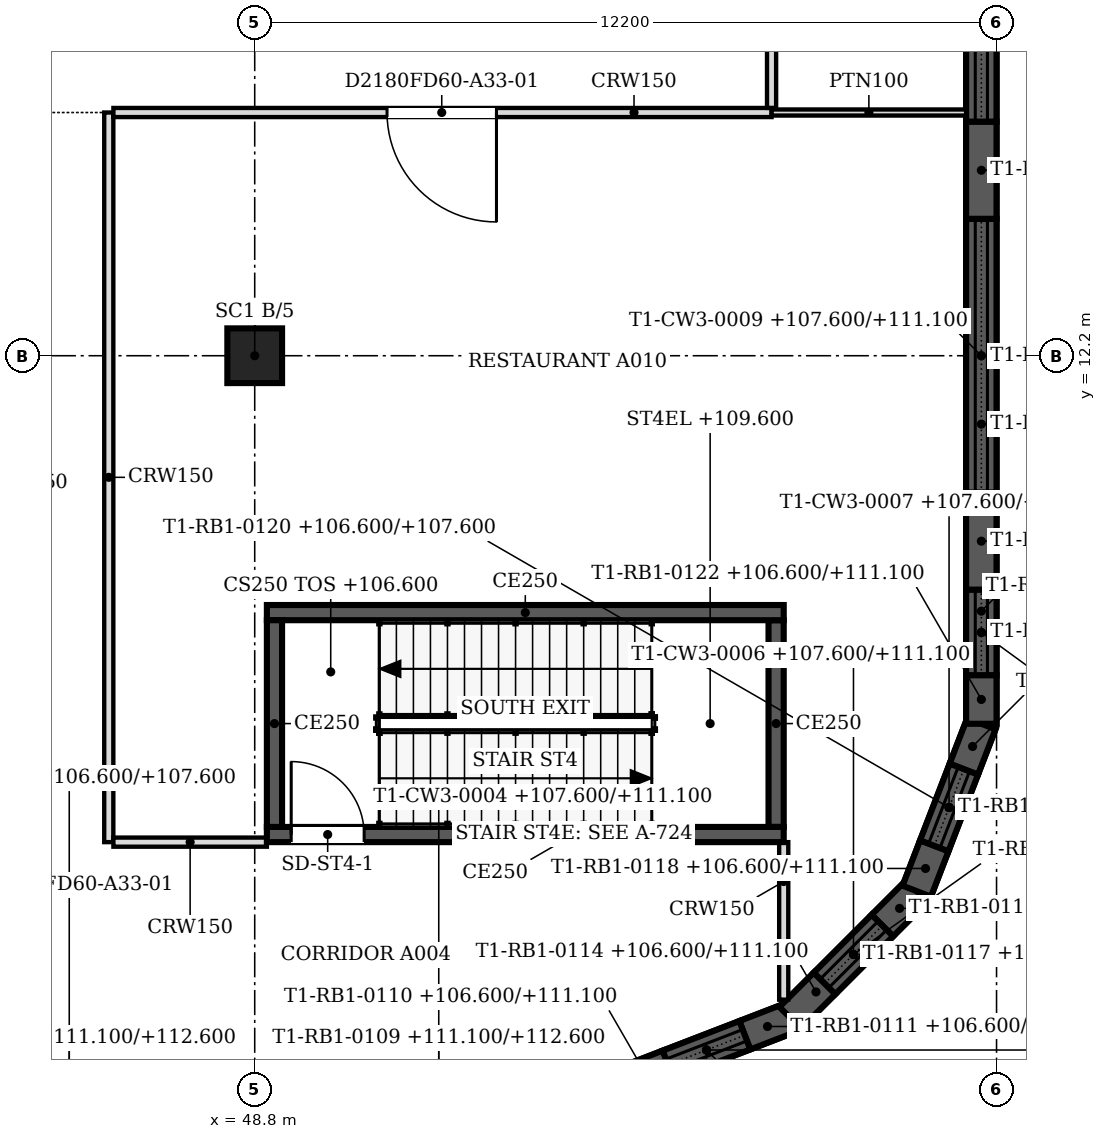
"""IFC4 building model, lengths in metres.
Left out: names, types, materials, properties, quantities, classifications, styles, units other than length and angle.
Written with IfcOpenShell. Run it as: python <this file> out.ifc"""

import sys

from ifc_helpers import new_model, si_unit, direction, frame, frame_2d, origin, origin_2d, place, context, subcontext, project, spatial, polyline, rectangle, outline, extrude, faceted_brep, source, transform, mapped, element, fill, save


model = new_model("IFC4")
c1 = context("Model", 3, precision=1e-05, world=origin(), true_north=direction((0.0, 1.0)))
c2 = subcontext(c1, "Body", "Model", "MODEL_VIEW")
j1 = project(units=[si_unit("LENGTHUNIT", "METRE"), si_unit("PLANEANGLEUNIT", "RADIAN")], contexts=[c1])
p1 = place(None, origin())
s1 = spatial("IfcSite", under=j1, at=p1, CompositionType="ELEMENT")
p2 = place(p1, origin())
s2 = spatial("IfcBuilding", under=s1, at=p2, CompositionType="ELEMENT")
p3 = place(p2, frame((0.0, 0.0, 106.6)))
s3 = spatial("IfcBuildingStorey", under=s2, at=p3, CompositionType="ELEMENT", Elevation=106.6)
p4 = place(p3, frame((48.8, 12.2, 0.0), z_axis=(0.0, 0.0, 1.0), x_axis=(1.0, 0.0, 0.0)))
e1 = element("IfcColumn", 1, at=p4, inside=s3, PredefinedType="COLUMN", context=c2, shape_type="SweptSolid", body=[
    extrude(rectangle(XDim=0.9, YDim=0.9, at=origin_2d()), origin(), (0.0, 0.0, 1.0), 5.8),
])
m1 = source(origin(), c2, "Body", "Brep", [
    faceted_brep([(0.0, -0.25, 0.0), (0.8, -0.25, 0.0), (0.8, -0.25, 4.5), (0.0, -0.25, 4.5), (0.047, 0.25, 4.5), (0.8, 0.25, 4.5), (0.8, 0.25, 0.0), (0.047, 0.25, 0.0), (0.0, 0.0, 0.0), (0.0, 0.0, 4.5)], [[[0, 1, 2, 3]], [[4, 5, 6, 7]], [[7, 6, 1, 0, 8]], [[5, 4, 9, 3, 2]], [[8, 0, 3, 9]], [[7, 8, 9, 4]], [[1, 6, 5, 2]]]),
])
p5 = place(p3, frame((54.854, 0.25, 0.0), z_axis=(0.0, 0.0, 1.0), x_axis=(0.93301483327, 0.3598379092, 0.0)))
e2 = element("IfcWall", 2, at=p5, inside=s3, PredefinedType="SOLIDWALL", context=c2, shape_type="MappedRepresentation", body=[
    mapped(m1, transform((0.0, 0.0, 0.0), scale=1.0)),
])
m2 = source(origin(), c2, "Body", "Brep", [
    faceted_brep([(0.0, -0.25, 0.0), (0.8, -0.25, 0.0), (0.8, -0.25, 4.5), (0.0, -0.25, 4.5), (0.0, 0.25, 4.5), (0.747, 0.25, 4.5), (0.747, 0.25, 0.0), (0.0, 0.25, 0.0), (0.8, -0.0, 0.0), (0.8, -0.0, 4.5)], [[[0, 1, 2, 3]], [[4, 5, 6, 7]], [[7, 6, 8, 1, 0]], [[9, 2, 1, 8]], [[5, 4, 3, 2, 9]], [[4, 7, 0, 3]], [[8, 6, 5, 9]]]),
])
p6 = place(p3, frame((56.86, 1.024, 0.0), z_axis=(0.0, 0.0, 1.0), x_axis=(0.932912338632, 0.360103552367, 0.0)))
e3 = element("IfcWall", 3, at=p6, inside=s3, PredefinedType="SOLIDWALL", context=c2, shape_type="MappedRepresentation", body=[
    mapped(m2, transform((0.0, 0.0, 0.0), scale=1.0)),
])
m3 = source(origin(), c2, "Body", "SweptSolid", [
    extrude(outline(polyline([(0.0, 0.0), (1.351, 0.0), (1.351, 1.0), (0.0, 1.0), (0.0, 0.0)])), frame((0.0, 0.25, 0.0), z_axis=(0.0, -1.0, 0.0), x_axis=(1.0, 0.0, 0.0)), (0.0, 0.0, 1.0), 0.5),
])
p7 = place(p3, frame((55.6, 0.538, 0.0), z_axis=(0.0, 0.0, 1.0), x_axis=(0.932981713512, 0.359923772835, 0.0)))
e4 = element("IfcWall", 4, at=p7, inside=s3, PredefinedType="SOLIDWALL", context=c2, shape_type="MappedRepresentation", body=[
    mapped(m3, transform((0.0, 0.0, 0.0), scale=1.0)),
])
m4 = source(origin(), c2, "Body", "Brep", [
    faceted_brep([(0.0, -0.25, 0.0), (2.95, -0.25, 0.0), (2.95, -0.25, 1.5), (0.0, -0.25, 1.5), (0.047, 0.25, 1.5), (2.898, 0.25, 1.5), (2.898, 0.25, 0.0), (0.047, 0.25, 0.0), (2.95, 0.0, 0.0), (0.0, 0.0, 0.0), (2.95, 0.0, 1.5), (0.0, 0.0, 1.5)], [[[0, 1, 2, 3]], [[4, 5, 6, 7]], [[7, 6, 8, 1, 0, 9]], [[10, 2, 1, 8]], [[5, 4, 11, 3, 2, 10]], [[9, 0, 3, 11]], [[7, 9, 11, 4]], [[8, 6, 5, 10]]]),
])
p8 = place(p3, frame((54.854, 0.25, 4.5), z_axis=(0.0, 0.0, 1.0), x_axis=(0.932999673775, 0.359877213415, 0.0)))
e5 = element("IfcWall", 5, at=p8, inside=s3, PredefinedType="SOLIDWALL", context=c2, shape_type="MappedRepresentation", body=[
    mapped(m4, transform((0.0, 0.0, 0.0), scale=1.0)),
])
m5 = source(origin(), c2, "Body", "Brep", [
    faceted_brep([(0.0, -0.25, 0.0), (0.8, -0.25, 0.0), (0.8, -0.25, 4.5), (0.0, -0.25, 4.5), (0.053, 0.25, 4.5), (0.8, 0.25, 4.5), (0.8, 0.25, 0.0), (0.053, 0.25, 0.0), (0.0, 0.0, 0.0), (0.0, 0.0, 4.5)], [[[0, 1, 2, 3]], [[4, 5, 6, 7]], [[7, 6, 1, 0, 8]], [[5, 4, 9, 3, 2]], [[8, 0, 3, 9]], [[7, 8, 9, 4]], [[1, 6, 5, 2]]]),
])
p9 = place(p3, frame((57.606, 1.312, 0.0), z_axis=(0.0, 0.0, 1.0), x_axis=(0.707106781187, 0.707106781187, 0.0)))
e6 = element("IfcWall", 6, at=p9, inside=s3, PredefinedType="SOLIDWALL", context=c2, shape_type="MappedRepresentation", body=[
    mapped(m5, transform((0.0, 0.0, 0.0), scale=1.0)),
])
p10 = place(p3, frame((59.122, 2.828, 0.0), z_axis=(0.0, 0.0, 1.0), x_axis=(0.707259322823, 0.706954206636, 0.0)))
e7 = element("IfcWall", 7, at=p10, inside=s3, PredefinedType="SOLIDWALL", context=c2, shape_type="MappedRepresentation", body=[
    mapped(m2, transform((0.0, 0.0, 0.0), scale=1.0)),
])
m6 = source(origin(), c2, "Body", "SweptSolid", [
    extrude(outline(polyline([(0.0, 0.0), (1.344, 0.0), (1.344, 1.0), (0.0, 1.0), (0.0, 0.0)])), frame((0.0, 0.25, 0.0), z_axis=(0.0, -1.0, 0.0), x_axis=(1.0, 0.0, 0.0)), (0.0, 0.0, 1.0), 0.5),
])
p11 = place(p3, frame((58.172, 1.878, 0.0), z_axis=(0.0, 0.0, 1.0), x_axis=(0.707106781187, 0.707106781187, 0.0)))
e8 = element("IfcWall", 8, at=p11, inside=s3, PredefinedType="SOLIDWALL", context=c2, shape_type="MappedRepresentation", body=[
    mapped(m6, transform((0.0, 0.0, 0.0), scale=1.0)),
])
m7 = source(origin(), c2, "Body", "Brep", [
    faceted_brep([(0.0, -0.25, 0.0), (2.944, -0.25, 0.0), (2.944, -0.25, 1.5), (0.0, -0.25, 1.5), (0.053, 0.25, 1.5), (2.891, 0.25, 1.5), (2.891, 0.25, 0.0), (0.053, 0.25, 0.0), (2.944, 0.0, 0.0), (0.0, 0.0, 0.0), (2.944, 0.0, 1.5), (0.0, 0.0, 1.5)], [[[0, 1, 2, 3]], [[4, 5, 6, 7]], [[7, 6, 8, 1, 0, 9]], [[10, 2, 1, 8]], [[5, 4, 11, 3, 2, 10]], [[9, 0, 3, 11]], [[7, 9, 11, 4]], [[8, 6, 5, 10]]]),
])
p12 = place(p3, frame((57.606, 1.312, 4.5), z_axis=(0.0, 0.0, 1.0), x_axis=(0.707106781187, 0.707106781187, 0.0)))
e9 = element("IfcWall", 9, at=p12, inside=s3, PredefinedType="SOLIDWALL", context=c2, shape_type="MappedRepresentation", body=[
    mapped(m7, transform((0.0, 0.0, 0.0), scale=1.0)),
])
p13 = place(p3, frame((59.688, 3.394, 0.0), z_axis=(0.0, 0.0, 1.0), x_axis=(0.360103552367, 0.932912338632, 0.0)))
e10 = element("IfcWall", 10, at=p13, inside=s3, PredefinedType="SOLIDWALL", context=c2, shape_type="MappedRepresentation", body=[
    mapped(m5, transform((0.0, 0.0, 0.0), scale=1.0)),
])
m8 = source(origin(), c2, "Body", "Brep", [
    faceted_brep([(0.0, -0.25, 0.0), (0.8, -0.25, 0.0), (0.8, -0.25, 4.5), (0.0, -0.25, 4.5), (0.0, 0.25, 4.5), (0.753, 0.25, 4.5), (0.753, 0.25, 0.0), (0.0, 0.25, 0.0), (0.8, -0.0, 0.0), (0.8, -0.0, 4.5)], [[[0, 1, 2, 3]], [[4, 5, 6, 7]], [[7, 6, 8, 1, 0]], [[9, 2, 1, 8]], [[5, 4, 3, 2, 9]], [[4, 7, 0, 3]], [[8, 6, 5, 9]]]),
])
p14 = place(p3, frame((60.462, 5.4, 0.0), z_axis=(0.0, 0.0, 1.0), x_axis=(0.3598379092, 0.93301483327, 0.0)))
e11 = element("IfcWall", 11, at=p14, inside=s3, PredefinedType="SOLIDWALL", context=c2, shape_type="MappedRepresentation", body=[
    mapped(m8, transform((0.0, 0.0, 0.0), scale=1.0)),
])
p15 = place(p3, frame((59.976, 4.14, 0.0), z_axis=(0.0, 0.0, 1.0), x_axis=(0.359923772835, 0.932981713512, 0.0)))
e12 = element("IfcWall", 12, at=p15, inside=s3, PredefinedType="SOLIDWALL", context=c2, shape_type="MappedRepresentation", body=[
    mapped(m3, transform((0.0, 0.0, 0.0), scale=1.0)),
])
m9 = source(origin(), c2, "Body", "Brep", [
    faceted_brep([(0.0, -0.25, 0.0), (2.95, -0.25, 0.0), (2.95, -0.25, 1.5), (0.0, -0.25, 1.5), (0.053, 0.25, 1.5), (2.904, 0.25, 1.5), (2.904, 0.25, 0.0), (0.053, 0.25, 0.0), (2.95, 0.0, 0.0), (0.0, 0.0, 0.0), (2.95, 0.0, 1.5), (0.0, 0.0, 1.5)], [[[0, 1, 2, 3]], [[4, 5, 6, 7]], [[7, 6, 8, 1, 0, 9]], [[10, 2, 1, 8]], [[5, 4, 11, 3, 2, 10]], [[9, 0, 3, 11]], [[7, 9, 11, 4]], [[8, 6, 5, 10]]]),
])
p16 = place(p3, frame((59.688, 3.394, 4.5), z_axis=(0.0, 0.0, 1.0), x_axis=(0.359949242603, 0.932971887438, 0.0)))
e13 = element("IfcWall", 13, at=p16, inside=s3, PredefinedType="SOLIDWALL", context=c2, shape_type="MappedRepresentation", body=[
    mapped(m9, transform((0.0, 0.0, 0.0), scale=1.0)),
])
m10 = source(origin(), c2, "Body", "Brep", [
    faceted_brep([(0.0, -0.25, 0.0), (0.8, -0.25, 0.0), (0.8, -0.25, 4.5), (0.0, -0.25, 4.5), (0.047, 0.25, 4.5), (0.8, 0.25, 4.5), (0.8, 0.25, 0.0), (0.047, 0.25, 0.0), (0.0, 0.0, 0.0), (0.0, 0.0, 4.5)], [[[0, 1, 2, 3]], [[4, 5, 6, 7]], [[7, 6, 1, 0, 8]], [[5, 4, 9, 3, 2]], [[8, 0, 3, 9]], [[7, 8, 9, 4]], [[1, 6, 5, 2]]]),
])
p17 = place(p3, frame((60.75, 6.146, 0.0), z_axis=(0.0, 0.0, 1.0), x_axis=(0.0, 1.0, 0.0)))
e14 = element("IfcWall", 14, at=p17, inside=s3, PredefinedType="SOLIDWALL", context=c2, shape_type="MappedRepresentation", body=[
    mapped(m10, transform((0.0, 0.0, 0.0), scale=1.0)),
])
m11 = source(origin(), c2, "Body", "Brep", [
    faceted_brep([(0.0, -0.25, 0.0), (1.6, -0.25, 0.0), (1.6, -0.25, 4.5), (0.0, -0.25, 4.5), (0.0, 0.25, 4.5), (1.6, 0.25, 4.5), (1.6, 0.25, 0.0), (0.0, 0.25, 0.0)], [[[0, 1, 2, 3]], [[4, 5, 6, 7]], [[7, 6, 1, 0]], [[5, 4, 3, 2]], [[4, 7, 0, 3]], [[1, 6, 5, 2]]]),
])
p18 = place(p3, frame((60.75, 8.35, 0.0), z_axis=(0.0, 0.0, 1.0), x_axis=(0.0, 1.0, 0.0)))
e15 = element("IfcWall", 15, at=p18, inside=s3, PredefinedType="SOLIDWALL", context=c2, shape_type="MappedRepresentation", body=[
    mapped(m11, transform((0.0, 0.0, 0.0), scale=1.0)),
])
m12 = source(origin(), c2, "Body", "SweptSolid", [
    extrude(outline(polyline([(0.0, 0.0), (1.6, 0.0), (1.6, 4.5), (0.0, 4.5), (0.0, 0.0)])), frame((0.0, 0.25, 0.0), z_axis=(0.0, -1.0, 0.0), x_axis=(1.0, 0.0, 0.0)), (0.0, 0.0, 1.0), 0.5),
])
p19 = place(p3, frame((60.75, 14.45, 0.0), z_axis=(0.0, 0.0, 1.0), x_axis=(0.0, 1.0, 0.0)))
e16 = element("IfcWall", 16, at=p19, inside=s3, PredefinedType="SOLIDWALL", context=c2, shape_type="MappedRepresentation", body=[
    mapped(m12, transform((0.0, 0.0, 0.0), scale=1.0)),
])
m13 = source(origin(), c2, "Body", "SweptSolid", [
    extrude(outline(polyline([(0.0, 0.0), (1.404, 0.0), (1.404, 1.0), (0.0, 1.0), (0.0, 0.0)])), frame((0.0, 0.25, 0.0), z_axis=(0.0, -1.0, 0.0), x_axis=(1.0, 0.0, 0.0)), (0.0, 0.0, 1.0), 0.5),
])
p20 = place(p3, frame((60.75, 6.947, 0.0), z_axis=(0.0, 0.0, 1.0), x_axis=(0.0, 1.0, 0.0)))
e17 = element("IfcWall", 17, at=p20, inside=s3, PredefinedType="SOLIDWALL", context=c2, shape_type="MappedRepresentation", body=[
    mapped(m13, transform((0.0, 0.0, 0.0), scale=1.0)),
])
m14 = source(origin(), c2, "Body", "Brep", [
    faceted_brep([(0.0, -0.25, 0.0), (3.003, -0.25, 0.0), (3.003, -0.25, 1.5), (0.0, -0.25, 1.5), (0.047, 0.25, 1.5), (3.003, 0.25, 1.5), (3.003, 0.25, 0.0), (0.047, 0.25, 0.0), (0.0, 0.0, 0.0), (0.0, 0.0, 1.5)], [[[0, 1, 2, 3]], [[4, 5, 6, 7]], [[7, 6, 1, 0, 8]], [[6, 5, 2, 1]], [[5, 4, 9, 3, 2]], [[8, 0, 3, 9]], [[7, 8, 9, 4]]]),
])
p21 = place(p3, frame((60.75, 6.146, 4.5), z_axis=(0.0, 0.0, 1.0), x_axis=(0.0, 1.0, 0.0)))
e18 = element("IfcWall", 18, at=p21, inside=s3, PredefinedType="SOLIDWALL", context=c2, shape_type="MappedRepresentation", body=[
    mapped(m14, transform((0.0, 0.0, 0.0), scale=1.0)),
])
m15 = source(origin(), c2, "Body", "SweptSolid", [
    extrude(outline(polyline([(0.0, 0.0), (4.5, 0.0), (4.5, 1.0), (0.0, 1.0), (0.0, 0.0)])), frame((0.0, 0.25, 0.0), z_axis=(0.0, -1.0, 0.0), x_axis=(1.0, 0.0, 0.0)), (0.0, 0.0, 1.0), 0.5),
])
p22 = place(p3, frame((60.75, 9.95, 0.0), z_axis=(0.0, 0.0, 1.0), x_axis=(0.0, 1.0, 0.0)))
e19 = element("IfcWall", 19, at=p22, inside=s3, PredefinedType="SOLIDWALL", context=c2, shape_type="MappedRepresentation", body=[
    mapped(m15, transform((0.0, 0.0, 0.0), scale=1.0)),
])
m16 = source(origin(), c2, "Body", "SweptSolid", [
    extrude(outline(polyline([(0.0, 0.0), (6.1, 0.0), (6.1, 1.5), (0.0, 1.5), (0.0, 0.0)])), frame((0.0, 0.25, 0.0), z_axis=(0.0, -1.0, 0.0), x_axis=(1.0, 0.0, 0.0)), (0.0, 0.0, 1.0), 0.5),
])
p23 = place(p3, frame((60.75, 9.15, 4.5), z_axis=(0.0, 0.0, 1.0), x_axis=(0.0, 1.0, 0.0)))
e20 = element("IfcWall", 20, at=p23, inside=s3, PredefinedType="SOLIDWALL", context=c2, shape_type="MappedRepresentation", body=[
    mapped(m16, transform((0.0, 0.0, 0.0), scale=1.0)),
])
p24 = place(p3, frame((60.75, 16.05, 0.0), z_axis=(0.0, 0.0, 1.0), x_axis=(0.0, 1.0, 0.0)))
e21 = element("IfcWall", 21, at=p24, inside=s3, PredefinedType="SOLIDWALL", context=c2, shape_type="MappedRepresentation", body=[
    mapped(m15, transform((0.0, 0.0, 0.0), scale=1.0)),
])
p25 = place(p3, frame((60.75, 15.25, 4.5), z_axis=(0.0, 0.0, 1.0), x_axis=(0.0, 1.0, 0.0)))
e22 = element("IfcWall", 22, at=p25, inside=s3, PredefinedType="SOLIDWALL", context=c2, shape_type="MappedRepresentation", body=[
    mapped(m16, transform((0.0, 0.0, 0.0), scale=1.0)),
])
p26 = place(p3, frame((57.5, 4.325, 0.0), z_axis=(0.0, 0.0, 1.0), x_axis=(-1.0, 0.0, 0.0)))
e23 = element("IfcWall", 23, at=p26, inside=s3, PredefinedType="SOLIDWALL", context=c2, shape_type="SweptSolid", body=[
    extrude(rectangle(XDim=8.5, YDim=0.25, at=frame_2d((4.25, 0.0))), origin(), (0.0, 0.0, 1.0), 6.0),
])
m17 = source(origin(), c2, "Body", "SweptSolid", [
    extrude(rectangle(XDim=1.2, YDim=2.1, at=frame_2d((0.6, 1.05))), frame((0.0, 0.135, 0.0), z_axis=(0.0, -1.0, 0.0), x_axis=(1.0, 0.0, 0.0)), (0.0, 0.0, 1.0), 0.27),
])
p27 = place(p26, frame((6.9, 0.0, 0.0)))
e24 = element("IfcOpeningElement", 24, at=p27, cuts=e23, PredefinedType="OPENING", context=c2, shape_type="MappedRepresentation", body=[
    mapped(m17, transform((0.0, 0.0, 0.0), scale=1.0)),
])
p28 = place(p3, frame((49.125, 4.45, 0.0), z_axis=(0.0, 0.0, 1.0), x_axis=(0.0, 1.0, 0.0)))
e25 = element("IfcWall", 25, at=p28, inside=s3, PredefinedType="SOLIDWALL", context=c2, shape_type="SweptSolid", body=[
    extrude(rectangle(XDim=3.4, YDim=0.25, at=frame_2d((1.7, 0.0))), origin(), (0.0, 0.0, 1.0), 6.0),
])
p29 = place(p3, frame((49.0, 7.975, 0.0), z_axis=(0.0, 0.0, 1.0), x_axis=(1.0, 0.0, 0.0)))
e26 = element("IfcWall", 26, at=p29, inside=s3, PredefinedType="SOLIDWALL", context=c2, shape_type="SweptSolid", body=[
    extrude(rectangle(XDim=8.5, YDim=0.25, at=frame_2d((4.25, 0.0))), origin(), (0.0, 0.0, 1.0), 6.0),
])
p30 = place(p3, frame((57.375, 7.85, 0.0), z_axis=(0.0, 0.0, 1.0), x_axis=(0.0, -1.0, 0.0)))
e27 = element("IfcWall", 27, at=p30, inside=s3, PredefinedType="SOLIDWALL", context=c2, shape_type="SweptSolid", body=[
    extrude(rectangle(XDim=3.4, YDim=0.25, at=frame_2d((1.7, 0.0))), origin(), (0.0, 0.0, 1.0), 6.0),
])
p31 = place(p3, frame((57.5, 1.609, 0.0), z_axis=(0.0, 0.0, 1.0), x_axis=(0.0, 1.0, 0.0)))
e28 = element("IfcWall", 28, at=p31, inside=s3, PredefinedType="PARTITIONING", context=c2, shape_type="SweptSolid", body=[
    extrude(rectangle(XDim=2.591, YDim=0.15, at=frame_2d((1.295, 0.0))), origin(), (0.0, 0.0, 1.0), 5.167),
])
p32 = place(p3, frame((46.4, 4.2, 0.0), z_axis=(0.0, 0.0, 1.0), x_axis=(0.0, 1.0, 0.0)))
e29 = element("IfcWall", 29, at=p32, inside=s3, PredefinedType="PARTITIONING", context=c2, shape_type="SweptSolid", body=[
    extrude(rectangle(XDim=12.0, YDim=0.15, at=frame_2d((6.0, 0.0))), origin(), (0.0, 0.0, 1.0), 5.167),
])
p33 = place(p3, frame((46.476, 4.2, 0.0), z_axis=(0.0, 0.0, 1.0), x_axis=(1.0, 0.0, 0.0)))
e30 = element("IfcWall", 30, at=p33, inside=s3, PredefinedType="PARTITIONING", context=c2, shape_type="SweptSolid", body=[
    extrude(rectangle(XDim=2.524, YDim=0.15, at=frame_2d((1.262, 0.0))), origin(), (0.0, 0.0, 1.0), 5.167),
])
p34 = place(p3, frame((57.3, 16.2, 0.0), z_axis=(0.0, 0.0, 1.0), x_axis=(-1.0, 0.0, 0.0)))
e31 = element("IfcWall", 31, at=p34, inside=s3, PredefinedType="PARTITIONING", context=c2, shape_type="SweptSolid", body=[
    extrude(rectangle(XDim=10.824, YDim=0.15, at=frame_2d((5.412, 0.0))), origin(), (0.0, 0.0, 1.0), 5.167),
])
m18 = source(origin(), c2, "Body", "SweptSolid", [
    extrude(rectangle(XDim=1.8, YDim=2.1, at=frame_2d((0.9, 1.05))), frame((0.0, 0.085, 0.0), z_axis=(0.0, -1.0, 0.0), x_axis=(1.0, 0.0, 0.0)), (0.0, 0.0, 1.0), 0.17),
])
p35 = place(p34, frame((4.524, 0.0, 0.0)))
e32 = element("IfcOpeningElement", 32, at=p35, cuts=e31, PredefinedType="OPENING", context=c2, shape_type="MappedRepresentation", body=[
    mapped(m18, transform((0.0, 0.0, 0.0), scale=1.0)),
])
p36 = place(p3, frame((57.301, 16.2, 0.0), z_axis=(0.0, 0.0, 1.0), x_axis=(1.0, 0.0, 0.0)))
e33 = element("IfcWall", 33, at=p36, inside=s3, PredefinedType="PARTITIONING", context=c2, shape_type="SweptSolid", body=[
    extrude(rectangle(XDim=3.199, YDim=0.1, at=frame_2d((1.6, 0.0))), origin(), (0.0, 0.0, 1.0), 5.167),
])
p37 = place(p3, frame((57.3, 30.6, 0.0), z_axis=(0.0, 0.0, 1.0), x_axis=(0.0, -1.0, 0.0)))
e34 = element("IfcWall", 34, at=p37, inside=s3, PredefinedType="PARTITIONING", context=c2, shape_type="SweptSolid", body=[
    extrude(rectangle(XDim=14.324, YDim=0.15, at=frame_2d((7.162, 0.0))), origin(), (0.0, 0.0, 1.0), 5.167),
])
m19 = source(origin(), c2, "Body", "SweptSolid", [
    extrude(rectangle(XDim=0.9, YDim=2.1, at=frame_2d((0.45, 1.05))), frame((0.0, 0.085, 0.0), z_axis=(0.0, -1.0, 0.0), x_axis=(1.0, 0.0, 0.0)), (0.0, 0.0, 1.0), 0.17),
])
p38 = place(p37, frame((2.699, 0.0, 0.0)))
e35 = element("IfcOpeningElement", 35, at=p38, cuts=e34, PredefinedType="OPENING", context=c2, shape_type="MappedRepresentation", body=[
    mapped(m19, transform((0.0, 0.0, 0.0), scale=1.0)),
])
p39 = place(p37, frame((9.824, 0.0, 0.0)))
e36 = element("IfcOpeningElement", 36, at=p39, cuts=e34, PredefinedType="OPENING", context=c2, shape_type="MappedRepresentation", body=[
    mapped(m19, transform((0.0, 0.0, 0.0), scale=1.0)),
])
m20 = source(origin(), c2, "Body", "SweptSolid", [
    extrude(rectangle(XDim=1.2, YDim=2.1, at=frame_2d((0.6, 1.05))), frame((0.0, 0.025, 0.0), z_axis=(0.0, -1.0, 0.0), x_axis=(1.0, 0.0, 0.0)), (0.0, 0.0, 1.0), 0.05),
])
p40 = place(p27, origin())
e37 = element("IfcDoor", 37, at=p40, inside=s3, OperationType="SINGLE_SWING_RIGHT", PredefinedType="DOOR", context=c2, shape_type="MappedRepresentation", body=[
    mapped(m20, transform((0.0, 0.0, 0.0), scale=1.0)),
])
fill(e24, e37)
m21 = source(origin(), c2, "Body", "SweptSolid", [
    extrude(rectangle(XDim=1.8, YDim=2.1, at=frame_2d((0.9, 1.05))), frame((0.0, 0.025, 0.0), z_axis=(0.0, -1.0, 0.0), x_axis=(1.0, 0.0, 0.0)), (0.0, 0.0, 1.0), 0.05),
])
p41 = place(p35, origin())
e38 = element("IfcDoor", 38, at=p41, inside=s3, OperationType="DOUBLE_DOOR_SINGLE_SWING", PredefinedType="DOOR", context=c2, shape_type="MappedRepresentation", body=[
    mapped(m21, transform((0.0, 0.0, 0.0), scale=1.0)),
])
fill(e32, e38)
save(model, sys.argv[1])
